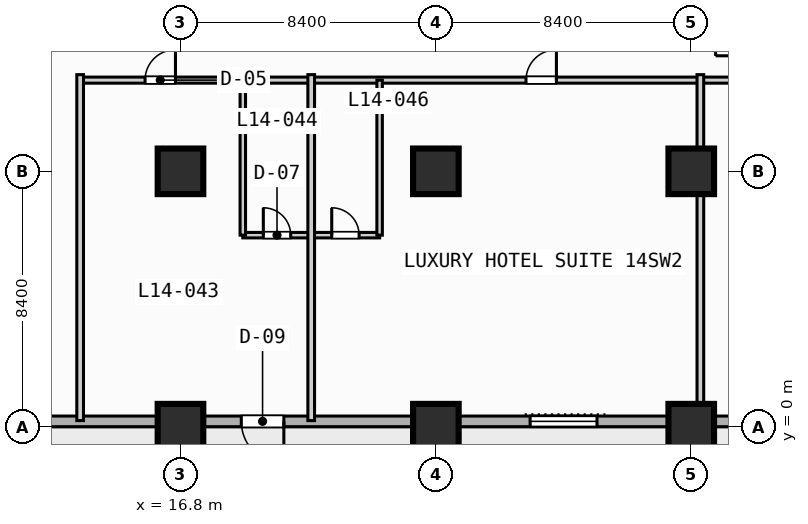
"""IFC4 building model, lengths in metres.
Left out: names, types, materials, properties, quantities, classifications, styles, units other than length and angle.
Written with IfcOpenShell. Run it as: python <this file> out.ifc"""

import sys

from ifc_helpers import new_model, si_unit, direction, frame, frame_2d, origin, origin_2d, place, context, subcontext, project, spatial, rectangle, extrude, element, fill, save


model = new_model("IFC4")
c1 = context("Model", 3, precision=1e-05, world=origin(), true_north=direction((0.0, 1.0)))
c2 = subcontext(c1, "Body", "Model", "MODEL_VIEW")
j1 = project(units=[si_unit("LENGTHUNIT", "METRE"), si_unit("PLANEANGLEUNIT", "RADIAN")], contexts=[c1])
p1 = place(None, origin())
s1 = spatial("IfcSite", under=j1, at=p1, CompositionType="ELEMENT")
p2 = place(p1, origin())
s2 = spatial("IfcBuilding", under=s1, at=p2, CompositionType="ELEMENT")
p3 = place(p2, frame((0.0, 0.0, 62.4)))
s3 = spatial("IfcBuildingStorey", under=s2, at=p3, CompositionType="ELEMENT", Elevation=62.4)
for number, where, z_axis, x_axis in (
    (1, (16.8, 0.0, 0.0), (0.0, 0.0, 1.0), (1.0, 0.0, 0.0)),
    (2, (16.8, 8.4, 0.0), (0.0, 0.0, 1.0), (1.0, 0.0, 0.0)),
    (3, (25.2, 0.0, 0.0), (0.0, 0.0, 1.0), (1.0, 0.0, 0.0)),
    (4, (25.2, 8.4, 0.0), (0.0, 0.0, 1.0), (1.0, 0.0, 0.0)),
    (5, (33.6, 0.0, 0.0), (0.0, 0.0, 1.0), (1.0, 0.0, 0.0)),
    (6, (33.6, 8.4, 0.0), (0.0, 0.0, 1.0), (1.0, 0.0, 0.0)),
):
    element("IfcColumn", number, at=place(p3, frame(where, z_axis=z_axis, x_axis=x_axis)), inside=s3, PredefinedType="COLUMN", context=c2, shape_type="SweptSolid", body=[
        extrude(rectangle(XDim=1.5, YDim=1.5, at=origin_2d()), origin(), (0.0, 0.0, 1.0), 3.8),
    ])
p4 = place(p3, frame((89.225, 0.175, 0.0), z_axis=(0.0, 0.0, 1.0), x_axis=(-1.0, 0.0, 0.0)))
e7 = element("IfcWall", 7, at=p4, inside=s3, PredefinedType="STANDARD", context=c2, shape_type="SweptSolid", body=[
    extrude(rectangle(XDim=86.05, YDim=0.35, at=frame_2d((43.025, 0.0))), origin(), (0.0, 0.0, 1.0), 3.55),
])
p5 = place(p4, frame((69.025, 0.0, 0.0)))
e8 = element("IfcOpeningElement", 8, at=p5, cuts=e7, PredefinedType="OPENING", context=c2, shape_type="SweptSolid", body=[
    extrude(rectangle(XDim=1.4, YDim=2.2, at=frame_2d((0.7, 1.1))), frame((0.0, 0.185, 0.0), z_axis=(0.0, -1.0, 0.0), x_axis=(1.0, 0.0, 0.0)), (0.0, 0.0, 1.0), 0.37),
])
p6 = place(p4, frame((58.725, 0.0, 0.85)))
e9 = element("IfcOpeningElement", 9, at=p6, cuts=e7, PredefinedType="OPENING", context=c2, shape_type="SweptSolid", body=[
    extrude(rectangle(XDim=2.2, YDim=1.8, at=frame_2d((1.1, 0.9))), frame((0.0, 0.185, 0.0), z_axis=(0.0, -1.0, 0.0), x_axis=(1.0, 0.0, 0.0)), (0.0, 0.0, 1.0), 0.37),
])
p7 = place(p4, frame((50.325, 0.0, 0.85)))
e10 = element("IfcOpeningElement", 10, at=p7, cuts=e7, PredefinedType="OPENING", context=c2, shape_type="SweptSolid", body=[
    extrude(rectangle(XDim=2.2, YDim=1.8, at=frame_2d((1.1, 0.9))), frame((0.0, 0.185, 0.0), z_axis=(0.0, -1.0, 0.0), x_axis=(1.0, 0.0, 0.0)), (0.0, 0.0, 1.0), 0.37),
])
p8 = place(p4, frame((41.925, 0.0, 0.85)))
e11 = element("IfcOpeningElement", 11, at=p8, cuts=e7, PredefinedType="OPENING", context=c2, shape_type="SweptSolid", body=[
    extrude(rectangle(XDim=2.2, YDim=1.8, at=frame_2d((1.1, 0.9))), frame((0.0, 0.185, 0.0), z_axis=(0.0, -1.0, 0.0), x_axis=(1.0, 0.0, 0.0)), (0.0, 0.0, 1.0), 0.37),
])
p9 = place(p4, frame((27.775, 0.0, 0.85)))
e12 = element("IfcOpeningElement", 12, at=p9, cuts=e7, PredefinedType="OPENING", context=c2, shape_type="SweptSolid", body=[
    extrude(rectangle(XDim=1.8, YDim=1.8, at=frame_2d((0.9, 0.9))), frame((0.0, 0.185, 0.0), z_axis=(0.0, -1.0, 0.0), x_axis=(1.0, 0.0, 0.0)), (0.0, 0.0, 1.0), 0.37),
])
p10 = place(p3, frame((13.5, 11.4, 0.0), z_axis=(0.0, 0.0, 1.0), x_axis=(1.0, 0.0, 0.0)))
e13 = element("IfcWall", 13, at=p10, inside=s3, PredefinedType="PARTITIONING", context=c2, shape_type="SweptSolid", body=[
    extrude(rectangle(XDim=50.3, YDim=0.2, at=frame_2d((25.15, 0.0))), origin(), (0.0, 0.0, 1.0), 3.55),
])
p11 = place(p10, frame((2.135, 0.0, 0.0)))
e14 = element("IfcOpeningElement", 14, at=p11, cuts=e13, PredefinedType="OPENING", context=c2, shape_type="SweptSolid", body=[
    extrude(rectangle(XDim=1.0, YDim=2.15, at=frame_2d((0.5, 1.075))), frame((0.0, 0.11, 0.0), z_axis=(0.0, -1.0, 0.0), x_axis=(1.0, 0.0, 0.0)), (0.0, 0.0, 1.0), 0.22),
])
p12 = place(p10, frame((14.665, 0.0, 0.0)))
e15 = element("IfcOpeningElement", 15, at=p12, cuts=e13, PredefinedType="OPENING", context=c2, shape_type="SweptSolid", body=[
    extrude(rectangle(XDim=1.0, YDim=2.15, at=frame_2d((0.5, 1.075))), frame((0.0, 0.11, 0.0), z_axis=(0.0, -1.0, 0.0), x_axis=(1.0, 0.0, 0.0)), (0.0, 0.0, 1.0), 0.22),
])
p13 = place(p10, frame((22.31, 0.0, 0.0)))
e16 = element("IfcOpeningElement", 16, at=p13, cuts=e13, PredefinedType="OPENING", context=c2, shape_type="SweptSolid", body=[
    extrude(rectangle(XDim=1.0, YDim=2.15, at=frame_2d((0.5, 1.075))), frame((0.0, 0.11, 0.0), z_axis=(0.0, -1.0, 0.0), x_axis=(1.0, 0.0, 0.0)), (0.0, 0.0, 1.0), 0.22),
])
p14 = place(p10, frame((32.51, 0.0, 0.0)))
e17 = element("IfcOpeningElement", 17, at=p14, cuts=e13, PredefinedType="OPENING", context=c2, shape_type="SweptSolid", body=[
    extrude(rectangle(XDim=1.0, YDim=2.15, at=frame_2d((0.5, 1.075))), frame((0.0, 0.11, 0.0), z_axis=(0.0, -1.0, 0.0), x_axis=(1.0, 0.0, 0.0)), (0.0, 0.0, 1.0), 0.22),
])
p15 = place(p10, frame((43.885, 0.0, 0.0)))
e18 = element("IfcOpeningElement", 18, at=p15, cuts=e13, PredefinedType="OPENING", context=c2, shape_type="SweptSolid", body=[
    extrude(rectangle(XDim=1.0, YDim=2.15, at=frame_2d((0.5, 1.075))), frame((0.0, 0.11, 0.0), z_axis=(0.0, -1.0, 0.0), x_axis=(1.0, 0.0, 0.0)), (0.0, 0.0, 1.0), 0.22),
])
p16 = place(p3, frame((13.5, 0.2, 0.0), z_axis=(0.0, 0.0, 1.0), x_axis=(0.0, 1.0, 0.0)))
e19 = element("IfcWall", 19, at=p16, inside=s3, PredefinedType="PARTITIONING", context=c2, shape_type="SweptSolid", body=[
    extrude(rectangle(XDim=11.38, YDim=0.22, at=frame_2d((5.69, 0.0))), origin(), (0.0, 0.0, 1.0), 3.55),
])
p17 = place(p3, frame((18.85, 6.3, 0.0), z_axis=(0.0, 0.0, 1.0), x_axis=(1.0, 0.0, 0.0)))
e20 = element("IfcWall", 20, at=p17, inside=s3, PredefinedType="PLUMBINGWALL", context=c2, shape_type="SweptSolid", body=[
    extrude(rectangle(XDim=4.5, YDim=0.18, at=frame_2d((2.25, 0.0))), origin(), (0.0, 0.0, 1.0), 3.55),
])
p18 = place(p17, frame((0.675, 0.0, 0.0)))
e21 = element("IfcOpeningElement", 21, at=p18, cuts=e20, PredefinedType="OPENING", context=c2, shape_type="SweptSolid", body=[
    extrude(rectangle(XDim=0.9, YDim=2.1, at=frame_2d((0.45, 1.05))), frame((0.0, 0.1, 0.0), z_axis=(0.0, -1.0, 0.0), x_axis=(1.0, 0.0, 0.0)), (0.0, 0.0, 1.0), 0.2),
])
p19 = place(p17, frame((2.925, 0.0, 0.0)))
e22 = element("IfcOpeningElement", 22, at=p19, cuts=e20, PredefinedType="OPENING", context=c2, shape_type="SweptSolid", body=[
    extrude(rectangle(XDim=0.9, YDim=2.1, at=frame_2d((0.45, 1.05))), frame((0.0, 0.1, 0.0), z_axis=(0.0, -1.0, 0.0), x_axis=(1.0, 0.0, 0.0)), (0.0, 0.0, 1.0), 0.2),
])
p20 = place(p3, frame((18.85, 6.3, 0.0), z_axis=(0.0, 0.0, 1.0), x_axis=(0.0, 1.0, 0.0)))
e23 = element("IfcWall", 23, at=p20, inside=s3, PredefinedType="PLUMBINGWALL", context=c2, shape_type="SweptSolid", body=[
    extrude(rectangle(XDim=5.1, YDim=0.18, at=frame_2d((2.55, 0.0))), origin(), (0.0, 0.0, 1.0), 3.55),
])
p21 = place(p3, frame((21.1, 0.2, 0.0), z_axis=(0.0, 0.0, 1.0), x_axis=(0.0, 1.0, 0.0)))
e24 = element("IfcWall", 24, at=p21, inside=s3, PredefinedType="PARTITIONING", context=c2, shape_type="SweptSolid", body=[
    extrude(rectangle(XDim=11.38, YDim=0.22, at=frame_2d((5.69, 0.0))), origin(), (0.0, 0.0, 1.0), 3.55),
])
p22 = place(p3, frame((23.35, 6.3, 0.0), z_axis=(0.0, 0.0, 1.0), x_axis=(0.0, 1.0, 0.0)))
e25 = element("IfcWall", 25, at=p22, inside=s3, PredefinedType="PLUMBINGWALL", context=c2, shape_type="SweptSolid", body=[
    extrude(rectangle(XDim=5.1, YDim=0.18, at=frame_2d((2.55, 0.0))), origin(), (0.0, 0.0, 1.0), 3.55),
])
p23 = place(p3, frame((33.9, 0.2, 0.0), z_axis=(0.0, 0.0, 1.0), x_axis=(0.0, 1.0, 0.0)))
e26 = element("IfcWall", 26, at=p23, inside=s3, PredefinedType="PARTITIONING", context=c2, shape_type="SweptSolid", body=[
    extrude(rectangle(XDim=11.38, YDim=0.22, at=frame_2d((5.69, 0.0))), origin(), (0.0, 0.0, 1.0), 2.8),
])
p24 = place(p5, origin())
e27 = element("IfcDoor", 27, at=p24, inside=s3, OperationType="SINGLE_SWING_LEFT", PredefinedType="DOOR", context=c2, shape_type="SweptSolid", body=[
    extrude(rectangle(XDim=1.4, YDim=2.2, at=frame_2d((0.7, 1.1))), frame((0.0, 0.025, 0.0), z_axis=(0.0, -1.0, 0.0), x_axis=(1.0, 0.0, 0.0)), (0.0, 0.0, 1.0), 0.05),
])
fill(e8, e27)
p25 = place(p6, origin())
e28 = element("IfcWindow", 28, at=p25, inside=s3, PartitioningType="SINGLE_PANEL", PredefinedType="WINDOW", context=c2, shape_type="SweptSolid", body=[
    extrude(rectangle(XDim=2.2, YDim=1.8, at=frame_2d((1.1, 0.9))), frame((0.0, 0.03, 0.0), z_axis=(0.0, -1.0, 0.0), x_axis=(1.0, 0.0, 0.0)), (0.0, 0.0, 1.0), 0.06),
])
fill(e9, e28)
p26 = place(p11, origin())
e29 = element("IfcDoor", 29, at=p26, inside=s3, OperationType="SINGLE_SWING_RIGHT", PredefinedType="DOOR", context=c2, shape_type="SweptSolid", body=[
    extrude(rectangle(XDim=1.0, YDim=2.15, at=frame_2d((0.5, 1.075))), frame((0.0, 0.025, 0.0), z_axis=(0.0, -1.0, 0.0), x_axis=(1.0, 0.0, 0.0)), (0.0, 0.0, 1.0), 0.05),
])
fill(e14, e29)
p27 = place(p12, origin())
e30 = element("IfcDoor", 30, at=p27, inside=s3, OperationType="SINGLE_SWING_RIGHT", PredefinedType="DOOR", context=c2, shape_type="SweptSolid", body=[
    extrude(rectangle(XDim=1.0, YDim=2.15, at=frame_2d((0.5, 1.075))), frame((0.0, 0.025, 0.0), z_axis=(0.0, -1.0, 0.0), x_axis=(1.0, 0.0, 0.0)), (0.0, 0.0, 1.0), 0.05),
])
fill(e15, e30)
p28 = place(p18, origin())
e31 = element("IfcDoor", 31, at=p28, inside=s3, OperationType="SINGLE_SWING_LEFT", PredefinedType="DOOR", context=c2, shape_type="SweptSolid", body=[
    extrude(rectangle(XDim=0.9, YDim=2.1, at=frame_2d((0.45, 1.05))), frame((0.0, 0.025, 0.0), z_axis=(0.0, -1.0, 0.0), x_axis=(1.0, 0.0, 0.0)), (0.0, 0.0, 1.0), 0.05),
])
fill(e21, e31)
p29 = place(p19, origin())
e32 = element("IfcDoor", 32, at=p29, inside=s3, OperationType="SINGLE_SWING_LEFT", PredefinedType="DOOR", context=c2, shape_type="SweptSolid", body=[
    extrude(rectangle(XDim=0.9, YDim=2.1, at=frame_2d((0.45, 1.05))), frame((0.0, 0.025, 0.0), z_axis=(0.0, -1.0, 0.0), x_axis=(1.0, 0.0, 0.0)), (0.0, 0.0, 1.0), 0.05),
])
fill(e22, e32)
save(model, sys.argv[1])
